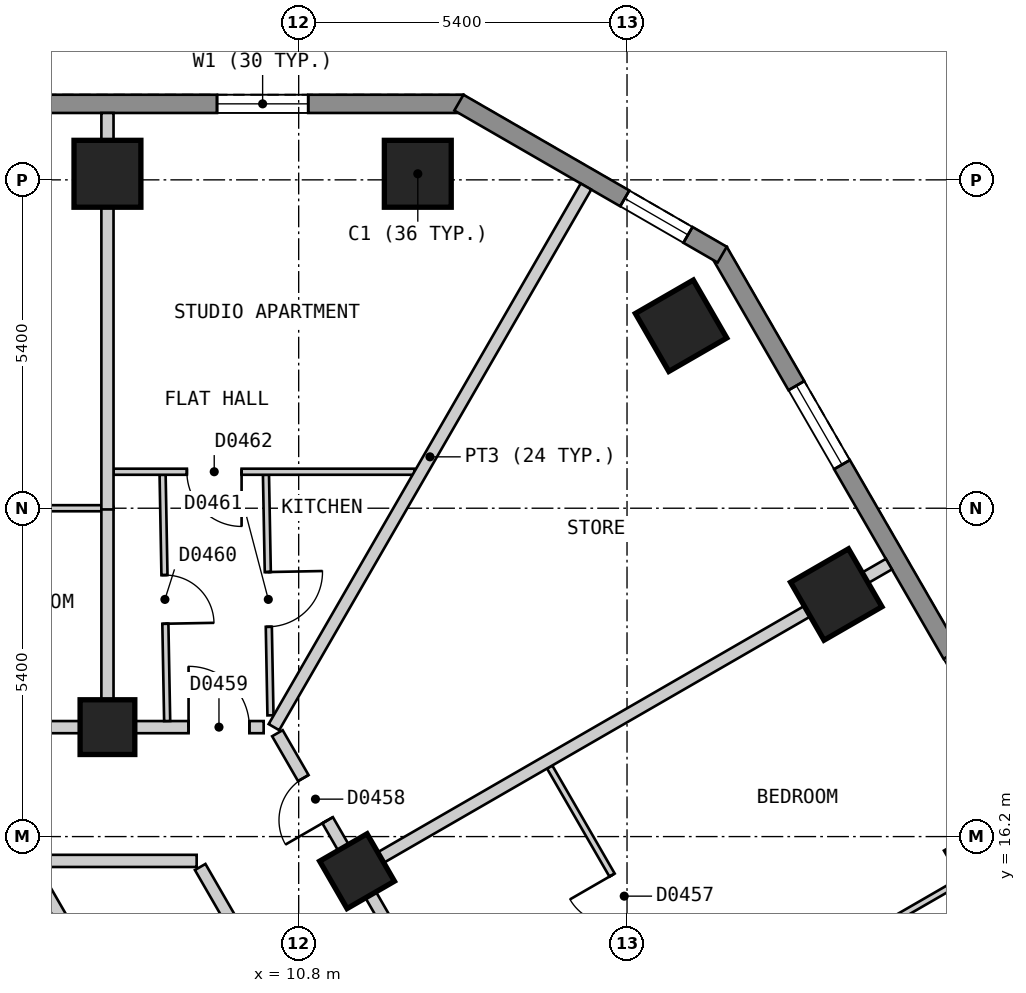
"""IFC4 building model, lengths in metres.
Left out: names, types, materials, properties, quantities, classifications, styles, units other than length and angle.
Written with IfcOpenShell. Run it as: python <this file> out.ifc"""

import sys

from ifc_helpers import new_model, si_unit, direction, frame, frame_2d, origin, origin_2d, place, context, subcontext, project, spatial, polyline, rectangle, outline, extrude, element, fill, save


model = new_model("IFC4")
c1 = context("Model", 3, precision=1e-05, world=origin(), true_north=direction((0.0, 1.0)))
c2 = subcontext(c1, "Body", "Model", "MODEL_VIEW")
j1 = project(units=[si_unit("LENGTHUNIT", "METRE"), si_unit("PLANEANGLEUNIT", "RADIAN")], contexts=[c1])
p1 = place(None, origin())
s1 = spatial("IfcSite", under=j1, at=p1, CompositionType="ELEMENT")
p2 = place(p1, origin())
s2 = spatial("IfcBuilding", under=s1, at=p2, CompositionType="ELEMENT")
p3 = place(p2, frame((0.0, 0.0, 26.4)))
s3 = spatial("IfcBuildingStorey", under=s2, at=p3, CompositionType="ELEMENT", Elevation=26.4)
for number, where, z_axis, x_axis in (
    (1, (12.759, 27.1, 0.0), (0.0, 0.0, 1.0), (-1.0, 0.0, 0.0)),
    (2, (7.655, 27.1, 0.0), (0.0, 0.0, 1.0), (-1.0, 0.0, 0.0)),
    (3, (22.193, 15.761, 0.0), (0.0, 0.0, 1.0), (-0.5, 0.866, 0.0)),
    (4, (19.641, 20.181, 0.0), (0.0, 0.0, 1.0), (-0.5, 0.866, 0.0)),
    (5, (17.089, 24.601, 0.0), (0.0, 0.0, 1.0), (-0.5, 0.866, 0.0)),
):
    element("IfcColumn", number, at=place(p3, frame(where, z_axis=z_axis, x_axis=x_axis)), inside=s3, PredefinedType="COLUMN", context=c2, shape_type="SweptSolid", body=[
        extrude(rectangle(XDim=1.1, YDim=1.1, at=origin_2d()), origin(), (0.0, 0.0, 1.0), 3.0),
    ])
for number, where, z_axis, x_axis in (
    (6, (11.76, 15.631, 0.0), (0.0, 0.0, 1.0), (-0.5, 0.866, 0.0)),
    (7, (7.655, 18.0, 0.0), (0.0, 0.0, 1.0), (-1.0, 0.0, 0.0)),
):
    element("IfcColumn", number, at=place(p3, frame(where, z_axis=z_axis, x_axis=x_axis)), inside=s3, PredefinedType="COLUMN", context=c2, shape_type="SweptSolid", body=[
        extrude(rectangle(XDim=0.9, YDim=0.9, at=origin_2d()), origin(), (0.0, 0.0, 1.0), 3.0),
    ])
p4 = place(p3, frame((13.51, 28.25, 0.0), z_axis=(0.0, 0.0, 1.0), x_axis=(-1.0, 0.0, 0.0)))
e8 = element("IfcWall", 8, at=p4, inside=s3, PredefinedType="SOLIDWALL", context=c2, shape_type="SweptSolid", body=[
    extrude(outline(polyline([(0.0, -0.15), (27.02, -0.15), (26.94, 0.15), (0.08, 0.15), (0.0, -0.15)])), origin(), (0.0, 0.0, 1.0), 2.7),
])
p5 = place(p4, frame((2.553, 0.0, 0.15)))
e9 = element("IfcOpeningElement", 9, at=p5, cuts=e8, PredefinedType="OPENING", context=c2, shape_type="SweptSolid", body=[
    extrude(rectangle(XDim=1.5, YDim=2.1, at=frame_2d((0.75, 1.05))), frame((0.0, 0.16, 0.0), z_axis=(0.0, -1.0, 0.0), x_axis=(1.0, 0.0, 0.0)), (0.0, 0.0, 1.0), 0.32),
])
p6 = place(p4, frame((7.657, 0.0, 0.15)))
e10 = element("IfcOpeningElement", 10, at=p6, cuts=e8, PredefinedType="OPENING", context=c2, shape_type="SweptSolid", body=[
    extrude(rectangle(XDim=1.5, YDim=2.1, at=frame_2d((0.75, 1.05))), frame((0.0, 0.16, 0.0), z_axis=(0.0, -1.0, 0.0), x_axis=(1.0, 0.0, 0.0)), (0.0, 0.0, 1.0), 0.32),
])
p7 = place(p4, frame((12.761, 0.0, 0.15)))
e11 = element("IfcOpeningElement", 11, at=p7, cuts=e8, PredefinedType="OPENING", context=c2, shape_type="SweptSolid", body=[
    extrude(rectangle(XDim=1.5, YDim=2.1, at=frame_2d((0.75, 1.05))), frame((0.0, 0.16, 0.0), z_axis=(0.0, -1.0, 0.0), x_axis=(1.0, 0.0, 0.0)), (0.0, 0.0, 1.0), 0.32),
])
p8 = place(p4, frame((17.865, 0.0, 0.15)))
e12 = element("IfcOpeningElement", 12, at=p8, cuts=e8, PredefinedType="OPENING", context=c2, shape_type="SweptSolid", body=[
    extrude(rectangle(XDim=1.5, YDim=2.1, at=frame_2d((0.75, 1.05))), frame((0.0, 0.16, 0.0), z_axis=(0.0, -1.0, 0.0), x_axis=(1.0, 0.0, 0.0)), (0.0, 0.0, 1.0), 0.32),
])
p9 = place(p4, frame((22.969, 0.0, 0.15)))
e13 = element("IfcOpeningElement", 13, at=p9, cuts=e8, PredefinedType="OPENING", context=c2, shape_type="SweptSolid", body=[
    extrude(rectangle(XDim=1.5, YDim=2.1, at=frame_2d((0.75, 1.05))), frame((0.0, 0.16, 0.0), z_axis=(0.0, -1.0, 0.0), x_axis=(1.0, 0.0, 0.0)), (0.0, 0.0, 1.0), 0.32),
])
p10 = place(p3, frame((31.22, 2.425, 0.0), z_axis=(0.0, 0.0, 1.0), x_axis=(-0.500001938803, 0.866024284413, 0.0)))
e14 = element("IfcWall", 14, at=p10, inside=s3, PredefinedType="SOLIDWALL", context=c2, shape_type="SweptSolid", body=[
    extrude(outline(polyline([(0.0, -0.15), (27.02, -0.15), (26.94, 0.15), (0.08, 0.15), (0.0, -0.15)])), origin(), (0.0, 0.0, 1.0), 2.7),
])
p11 = place(p10, frame((2.553, 0.0, 0.15)))
e15 = element("IfcOpeningElement", 15, at=p11, cuts=e14, PredefinedType="OPENING", context=c2, shape_type="SweptSolid", body=[
    extrude(rectangle(XDim=1.5, YDim=2.1, at=frame_2d((0.75, 1.05))), frame((0.0, 0.16, 0.0), z_axis=(0.0, -1.0, 0.0), x_axis=(1.0, 0.0, 0.0)), (0.0, 0.0, 1.0), 0.32),
])
p12 = place(p10, frame((7.657, 0.0, 0.15)))
e16 = element("IfcOpeningElement", 16, at=p12, cuts=e14, PredefinedType="OPENING", context=c2, shape_type="SweptSolid", body=[
    extrude(rectangle(XDim=1.5, YDim=2.1, at=frame_2d((0.75, 1.05))), frame((0.0, 0.16, 0.0), z_axis=(0.0, -1.0, 0.0), x_axis=(1.0, 0.0, 0.0)), (0.0, 0.0, 1.0), 0.32),
])
p13 = place(p10, frame((12.761, 0.0, 0.15)))
e17 = element("IfcOpeningElement", 17, at=p13, cuts=e14, PredefinedType="OPENING", context=c2, shape_type="SweptSolid", body=[
    extrude(rectangle(XDim=1.5, YDim=2.1, at=frame_2d((0.75, 1.05))), frame((0.0, 0.16, 0.0), z_axis=(0.0, -1.0, 0.0), x_axis=(1.0, 0.0, 0.0)), (0.0, 0.0, 1.0), 0.32),
])
p14 = place(p10, frame((17.865, 0.0, 0.15)))
e18 = element("IfcOpeningElement", 18, at=p14, cuts=e14, PredefinedType="OPENING", context=c2, shape_type="SweptSolid", body=[
    extrude(rectangle(XDim=1.5, YDim=2.1, at=frame_2d((0.75, 1.05))), frame((0.0, 0.16, 0.0), z_axis=(0.0, -1.0, 0.0), x_axis=(1.0, 0.0, 0.0)), (0.0, 0.0, 1.0), 0.32),
])
p15 = place(p10, frame((22.969, 0.0, 0.15)))
e19 = element("IfcOpeningElement", 19, at=p15, cuts=e14, PredefinedType="OPENING", context=c2, shape_type="SweptSolid", body=[
    extrude(rectangle(XDim=1.5, YDim=2.1, at=frame_2d((0.75, 1.05))), frame((0.0, 0.16, 0.0), z_axis=(0.0, -1.0, 0.0), x_axis=(1.0, 0.0, 0.0)), (0.0, 0.0, 1.0), 0.32),
])
p16 = place(p3, frame((17.765, 25.77, 0.0), z_axis=(0.0, 0.0, 1.0), x_axis=(-0.866010750942, 0.50002537861, 0.0)))
e20 = element("IfcWall", 20, at=p16, inside=s3, PredefinedType="SOLIDWALL", context=c2, shape_type="SweptSolid", body=[
    extrude(outline(polyline([(0.0, -0.15), (5.0, -0.15), (4.919, 0.15), (0.08, 0.15), (0.0, -0.15)])), origin(), (0.0, 0.0, 1.0), 2.7),
])
p17 = place(p16, frame((0.65, 0.0, 0.15)))
e21 = element("IfcOpeningElement", 21, at=p17, cuts=e20, PredefinedType="OPENING", context=c2, shape_type="SweptSolid", body=[
    extrude(rectangle(XDim=1.2, YDim=2.1, at=frame_2d((0.6, 1.05))), frame((0.0, 0.16, 0.0), z_axis=(0.0, -1.0, 0.0), x_axis=(1.0, 0.0, 0.0)), (0.0, 0.0, 1.0), 0.32),
])
p18 = place(p3, frame((6.409, 15.7, 0.0), z_axis=(0.0, 0.0, 1.0), x_axis=(0.499930377127, -0.866065596838, 0.0)))
e22 = element("IfcWall", 22, at=p18, inside=s3, PredefinedType="PARTITIONING", context=c2, shape_type="SweptSolid", body=[
    extrude(rectangle(XDim=8.775, YDim=0.2, at=frame_2d((4.388, 0.0))), origin(), (0.0, 0.0, 1.0), 2.7),
])
p19 = place(p3, frame((9.18, 15.7, 0.0), z_axis=(0.0, 0.0, 1.0), x_axis=(0.500003652032, -0.866023295272, 0.0)))
e23 = element("IfcWall", 23, at=p19, inside=s3, PredefinedType="PARTITIONING", context=c2, shape_type="SweptSolid", body=[
    extrude(rectangle(XDim=18.012, YDim=0.2, at=frame_2d((9.006, 0.0))), origin(), (0.0, 0.0, 1.0), 2.7),
])
p20 = place(p19, frame((8.556, 0.0, 0.0)))
e24 = element("IfcOpeningElement", 24, at=p20, cuts=e23, PredefinedType="OPENING", context=c2, shape_type="SweptSolid", body=[
    extrude(rectangle(XDim=0.9, YDim=2.1, at=frame_2d((0.45, 1.05))), frame((0.0, 0.11, 0.0), z_axis=(0.0, -1.0, 0.0), x_axis=(1.0, 0.0, 0.0)), (0.0, 0.0, 1.0), 0.22),
])
p21 = place(p3, frame((10.45, 17.9, 0.0), z_axis=(0.0, 0.0, 1.0), x_axis=(0.500034352617, -0.866005569383, 0.0)))
e25 = element("IfcWall", 25, at=p21, inside=s3, PredefinedType="PARTITIONING", context=c2, shape_type="SweptSolid", body=[
    extrude(rectangle(XDim=20.553, YDim=0.2, at=frame_2d((10.276, 0.0))), origin(), (0.0, 0.0, 1.0), 2.7),
])
p22 = place(p21, frame((9.775, 0.0, 0.0)))
e26 = element("IfcOpeningElement", 26, at=p22, cuts=e25, PredefinedType="OPENING", context=c2, shape_type="SweptSolid", body=[
    extrude(rectangle(XDim=1.0, YDim=2.1, at=frame_2d((0.5, 1.05))), frame((0.0, 0.11, 0.0), z_axis=(0.0, -1.0, 0.0), x_axis=(1.0, 0.0, 0.0)), (0.0, 0.0, 1.0), 0.22),
])
p23 = place(p21, frame((0.852, 0.0, 0.0)))
e27 = element("IfcOpeningElement", 27, at=p23, cuts=e25, PredefinedType="OPENING", context=c2, shape_type="SweptSolid", body=[
    extrude(rectangle(XDim=0.8, YDim=2.1, at=frame_2d((0.4, 1.05))), frame((0.0, 0.11, 0.0), z_axis=(0.0, -1.0, 0.0), x_axis=(1.0, 0.0, 0.0)), (0.0, 0.0, 1.0), 0.22),
])
p24 = place(p3, frame((6.351, 15.8, 0.0), z_axis=(0.0, 0.0, 1.0), x_axis=(1.0, 0.0, 0.0)))
e28 = element("IfcWall", 28, at=p24, inside=s3, PredefinedType="PARTITIONING", context=c2, shape_type="SweptSolid", body=[
    extrude(rectangle(XDim=2.771, YDim=0.2, at=frame_2d((1.385, 0.0))), origin(), (0.0, 0.0, 1.0), 2.7),
])
p25 = place(p3, frame((-10.276, 18.0, 0.0), z_axis=(0.0, 0.0, 1.0), x_axis=(1.0, 0.0, 0.0)))
e29 = element("IfcWall", 29, at=p25, inside=s3, PredefinedType="PARTITIONING", context=c2, shape_type="SweptSolid", body=[
    extrude(rectangle(XDim=20.5, YDim=0.2, at=frame_2d((10.25, 0.0))), origin(), (0.0, 0.0, 1.0), 2.7),
])
p26 = place(p25, frame((19.265, 0.0, 0.0)))
e30 = element("IfcOpeningElement", 30, at=p26, cuts=e29, PredefinedType="OPENING", context=c2, shape_type="SweptSolid", body=[
    extrude(rectangle(XDim=1.0, YDim=2.1, at=frame_2d((0.5, 1.05))), frame((0.0, 0.11, 0.0), z_axis=(0.0, -1.0, 0.0), x_axis=(1.0, 0.0, 0.0)), (0.0, 0.0, 1.0), 0.22),
])
p27 = place(p25, frame((9.775, 0.0, 0.0)))
e31 = element("IfcOpeningElement", 31, at=p27, cuts=e29, PredefinedType="OPENING", context=c2, shape_type="SweptSolid", body=[
    extrude(rectangle(XDim=1.0, YDim=2.1, at=frame_2d((0.5, 1.05))), frame((0.0, 0.11, 0.0), z_axis=(0.0, -1.0, 0.0), x_axis=(1.0, 0.0, 0.0)), (0.0, 0.0, 1.0), 0.22),
])
p28 = place(p25, frame((4.671, 0.0, 0.0)))
e32 = element("IfcOpeningElement", 32, at=p28, cuts=e29, PredefinedType="OPENING", context=c2, shape_type="SweptSolid", body=[
    extrude(rectangle(XDim=1.0, YDim=2.1, at=frame_2d((0.5, 1.05))), frame((0.0, 0.11, 0.0), z_axis=(0.0, -1.0, 0.0), x_axis=(1.0, 0.0, 0.0)), (0.0, 0.0, 1.0), 0.22),
])
p29 = place(p3, frame((14.928, 17.344, 0.0), z_axis=(0.0, 0.0, 1.0), x_axis=(0.500029609304, -0.86600830817, 0.0)))
e33 = element("IfcWall", 33, at=p29, inside=s3, PredefinedType="PARTITIONING", context=c2, shape_type="SweptSolid", body=[
    extrude(rectangle(XDim=4.954, YDim=0.1, at=frame_2d((2.477, 0.0))), origin(), (0.0, 0.0, 1.0), 2.7),
])
p30 = place(p29, frame((2.052, 0.0, 0.0)))
e34 = element("IfcOpeningElement", 34, at=p30, cuts=e33, PredefinedType="OPENING", context=c2, shape_type="SweptSolid", body=[
    extrude(rectangle(XDim=0.8, YDim=2.1, at=frame_2d((0.4, 1.05))), frame((0.0, 0.06, 0.0), z_axis=(0.0, -1.0, 0.0), x_axis=(1.0, 0.0, 0.0)), (0.0, 0.0, 1.0), 0.12),
])
p31 = place(p3, frame((8.562, 22.15, 0.0), z_axis=(0.0, 0.0, 1.0), x_axis=(0.018504185939, -0.999828782894, 0.0)))
e35 = element("IfcWall", 35, at=p31, inside=s3, PredefinedType="PARTITIONING", context=c2, shape_type="SweptSolid", body=[
    extrude(rectangle(XDim=4.051, YDim=0.1, at=frame_2d((2.025, 0.0))), origin(), (0.0, 0.0, 1.0), 2.7),
])
p32 = place(p31, frame((1.65, 0.0, 0.0)))
e36 = element("IfcOpeningElement", 36, at=p32, cuts=e35, PredefinedType="OPENING", context=c2, shape_type="SweptSolid", body=[
    extrude(rectangle(XDim=0.8, YDim=2.1, at=frame_2d((0.4, 1.05))), frame((0.0, 0.06, 0.0), z_axis=(0.0, -1.0, 0.0), x_axis=(1.0, 0.0, 0.0)), (0.0, 0.0, 1.0), 0.12),
])
p33 = place(p3, frame((10.262, 22.15, 0.0), z_axis=(0.0, 0.0, 1.0), x_axis=(0.018696971826, -0.999825196344, 0.0)))
e37 = element("IfcWall", 37, at=p33, inside=s3, PredefinedType="PARTITIONING", context=c2, shape_type="SweptSolid", body=[
    extrude(rectangle(XDim=3.957, YDim=0.1, at=frame_2d((1.978, 0.0))), origin(), (0.0, 0.0, 1.0), 2.7),
])
p34 = place(p33, frame((1.6, 0.0, 0.0)))
e38 = element("IfcOpeningElement", 38, at=p34, cuts=e37, PredefinedType="OPENING", context=c2, shape_type="SweptSolid", body=[
    extrude(rectangle(XDim=0.9, YDim=2.1, at=frame_2d((0.45, 1.05))), frame((0.0, 0.06, 0.0), z_axis=(0.0, -1.0, 0.0), x_axis=(1.0, 0.0, 0.0)), (0.0, 0.0, 1.0), 0.12),
])
p35 = place(p3, frame((2.601, 21.6, 0.0), z_axis=(0.0, 0.0, 1.0), x_axis=(1.0, 0.0, 0.0)))
e39 = element("IfcWall", 39, at=p35, inside=s3, PredefinedType="PARTITIONING", context=c2, shape_type="SweptSolid", body=[
    extrude(rectangle(XDim=4.954, YDim=0.1, at=frame_2d((2.477, 0.0))), origin(), (0.0, 0.0, 1.0), 2.7),
])
p36 = place(p35, frame((2.102, 0.0, 0.0)))
e40 = element("IfcOpeningElement", 40, at=p36, cuts=e39, PredefinedType="OPENING", context=c2, shape_type="SweptSolid", body=[
    extrude(rectangle(XDim=0.8, YDim=2.1, at=frame_2d((0.4, 1.05))), frame((0.0, 0.06, 0.0), z_axis=(0.0, -1.0, 0.0), x_axis=(1.0, 0.0, 0.0)), (0.0, 0.0, 1.0), 0.12),
])
p37 = place(p3, frame((7.755, 22.2, 0.0), z_axis=(0.0, 0.0, 1.0), x_axis=(1.0, 0.0, 0.0)))
e41 = element("IfcWall", 41, at=p37, inside=s3, PredefinedType="PARTITIONING", context=c2, shape_type="SweptSolid", body=[
    extrude(rectangle(XDim=4.947, YDim=0.1, at=frame_2d((2.474, 0.0))), origin(), (0.0, 0.0, 1.0), 2.7),
])
p38 = place(p37, frame((1.206, 0.0, 0.0)))
e42 = element("IfcOpeningElement", 42, at=p38, cuts=e41, PredefinedType="OPENING", context=c2, shape_type="SweptSolid", body=[
    extrude(rectangle(XDim=0.9, YDim=2.1, at=frame_2d((0.45, 1.05))), frame((0.0, 0.06, 0.0), z_axis=(0.0, -1.0, 0.0), x_axis=(1.0, 0.0, 0.0)), (0.0, 0.0, 1.0), 0.12),
])
p39 = place(p3, frame((14.399, 11.261, 0.0), z_axis=(0.0, 0.0, 1.0), x_axis=(0.866022959057, 0.500004234368, 0.0)))
e43 = element("IfcWall", 43, at=p39, inside=s3, PredefinedType="PARTITIONING", context=c2, shape_type="SweptSolid", body=[
    extrude(rectangle(XDim=10.0, YDim=0.1, at=frame_2d((5.0, 0.0))), origin(), (0.0, 0.0, 1.0), 2.7),
])
p40 = place(p39, frame((4.775, 0.0, 0.0)))
e44 = element("IfcOpeningElement", 44, at=p40, cuts=e43, PredefinedType="OPENING", context=c2, shape_type="SweptSolid", body=[
    extrude(rectangle(XDim=0.9, YDim=2.1, at=frame_2d((0.45, 1.05))), frame((0.0, 0.06, 0.0), z_axis=(0.0, -1.0, 0.0), x_axis=(1.0, 0.0, 0.0)), (0.0, 0.0, 1.0), 0.12),
])
p41 = place(p3, frame((7.655, 21.62, 0.0), z_axis=(0.0, 0.0, 1.0), x_axis=(0.0, -1.0, 0.0)))
e45 = element("IfcWall", 45, at=p41, inside=s3, PredefinedType="PARTITIONING", context=c2, shape_type="SweptSolid", body=[
    extrude(rectangle(XDim=3.52, YDim=0.2, at=frame_2d((1.76, 0.0))), origin(), (0.0, 0.0, 1.0), 2.7),
])
p42 = place(p3, frame((10.393, 18.0, 0.0), z_axis=(0.0, 0.0, 1.0), x_axis=(0.499945497007, 0.866056868816, 0.0)))
e46 = element("IfcWall", 46, at=p42, inside=s3, PredefinedType="PARTITIONING", context=c2, shape_type="SweptSolid", body=[
    extrude(rectangle(XDim=10.265, YDim=0.2, at=frame_2d((5.132, 0.0))), origin(), (0.0, 0.0, 1.0), 2.7),
])
p43 = place(p3, frame((7.655, 21.58, 0.0), z_axis=(0.0, 0.0, 1.0), x_axis=(0.0, 1.0, 0.0)))
e47 = element("IfcWall", 47, at=p43, inside=s3, PredefinedType="PARTITIONING", context=c2, shape_type="SweptSolid", body=[
    extrude(rectangle(XDim=6.52, YDim=0.2, at=frame_2d((3.26, 0.0))), origin(), (0.0, 0.0, 1.0), 2.7),
])
p44 = place(p3, frame((11.847, 15.681, 0.0), z_axis=(0.0, 0.0, 1.0), x_axis=(0.866022959057, 0.500004234368, 0.0)))
e48 = element("IfcWall", 48, at=p44, inside=s3, PredefinedType="PARTITIONING", context=c2, shape_type="SweptSolid", body=[
    extrude(rectangle(XDim=10.0, YDim=0.2, at=frame_2d((5.0, 0.0))), origin(), (0.0, 0.0, 1.0), 2.7),
])
p45 = place(p5, origin())
e49 = element("IfcWindow", 49, at=p45, inside=s3, PartitioningType="SINGLE_PANEL", PredefinedType="WINDOW", context=c2, shape_type="SweptSolid", body=[
    extrude(rectangle(XDim=1.5, YDim=2.1, at=frame_2d((0.75, 1.05))), frame((0.0, 0.03, 0.0), z_axis=(0.0, -1.0, 0.0), x_axis=(1.0, 0.0, 0.0)), (0.0, 0.0, 1.0), 0.06),
])
fill(e9, e49)
p46 = place(p15, origin())
e50 = element("IfcWindow", 50, at=p46, inside=s3, PartitioningType="SINGLE_PANEL", PredefinedType="WINDOW", context=c2, shape_type="SweptSolid", body=[
    extrude(rectangle(XDim=1.5, YDim=2.1, at=frame_2d((0.75, 1.05))), frame((0.0, 0.03, 0.0), z_axis=(0.0, -1.0, 0.0), x_axis=(1.0, 0.0, 0.0)), (0.0, 0.0, 1.0), 0.06),
])
fill(e19, e50)
p47 = place(p17, origin())
e51 = element("IfcWindow", 51, at=p47, inside=s3, PartitioningType="SINGLE_PANEL", PredefinedType="WINDOW", context=c2, shape_type="SweptSolid", body=[
    extrude(rectangle(XDim=1.2, YDim=2.1, at=frame_2d((0.6, 1.05))), frame((0.0, 0.03, 0.0), z_axis=(0.0, -1.0, 0.0), x_axis=(1.0, 0.0, 0.0)), (0.0, 0.0, 1.0), 0.06),
])
fill(e21, e51)
p48 = place(p30, origin())
e52 = element("IfcDoor", 52, at=p48, inside=s3, OperationType="SINGLE_SWING_LEFT", PredefinedType="DOOR", context=c2, shape_type="SweptSolid", body=[
    extrude(rectangle(XDim=0.8, YDim=2.1, at=frame_2d((0.4, 1.05))), frame((0.0, 0.025, 0.0), z_axis=(0.0, -1.0, 0.0), x_axis=(1.0, 0.0, 0.0)), (0.0, 0.0, 1.0), 0.05),
])
fill(e34, e52)
p49 = place(p23, origin())
e53 = element("IfcDoor", 53, at=p49, inside=s3, OperationType="SINGLE_SWING_RIGHT", PredefinedType="DOOR", context=c2, shape_type="SweptSolid", body=[
    extrude(rectangle(XDim=0.8, YDim=2.1, at=frame_2d((0.4, 1.05))), frame((0.0, 0.025, 0.0), z_axis=(0.0, -1.0, 0.0), x_axis=(1.0, 0.0, 0.0)), (0.0, 0.0, 1.0), 0.05),
])
fill(e27, e53)
p50 = place(p26, origin())
e54 = element("IfcDoor", 54, at=p50, inside=s3, OperationType="SINGLE_SWING_LEFT", PredefinedType="DOOR", context=c2, shape_type="SweptSolid", body=[
    extrude(rectangle(XDim=1.0, YDim=2.1, at=frame_2d((0.5, 1.05))), frame((0.0, 0.025, 0.0), z_axis=(0.0, -1.0, 0.0), x_axis=(1.0, 0.0, 0.0)), (0.0, 0.0, 1.0), 0.05),
])
fill(e30, e54)
p51 = place(p32, origin())
e55 = element("IfcDoor", 55, at=p51, inside=s3, OperationType="SINGLE_SWING_RIGHT", PredefinedType="DOOR", context=c2, shape_type="SweptSolid", body=[
    extrude(rectangle(XDim=0.8, YDim=2.1, at=frame_2d((0.4, 1.05))), frame((0.0, 0.025, 0.0), z_axis=(0.0, -1.0, 0.0), x_axis=(1.0, 0.0, 0.0)), (0.0, 0.0, 1.0), 0.05),
])
fill(e36, e55)
p52 = place(p34, origin())
e56 = element("IfcDoor", 56, at=p52, inside=s3, OperationType="SINGLE_SWING_LEFT", PredefinedType="DOOR", context=c2, shape_type="SweptSolid", body=[
    extrude(rectangle(XDim=0.9, YDim=2.1, at=frame_2d((0.45, 1.05))), frame((0.0, 0.025, 0.0), z_axis=(0.0, -1.0, 0.0), x_axis=(1.0, 0.0, 0.0)), (0.0, 0.0, 1.0), 0.05),
])
fill(e38, e56)
p53 = place(p38, origin())
e57 = element("IfcDoor", 57, at=p53, inside=s3, OperationType="SINGLE_SWING_RIGHT", PredefinedType="DOOR", context=c2, shape_type="SweptSolid", body=[
    extrude(rectangle(XDim=0.9, YDim=2.1, at=frame_2d((0.45, 1.05))), frame((0.0, 0.025, 0.0), z_axis=(0.0, -1.0, 0.0), x_axis=(1.0, 0.0, 0.0)), (0.0, 0.0, 1.0), 0.05),
])
fill(e42, e57)
save(model, sys.argv[1])
